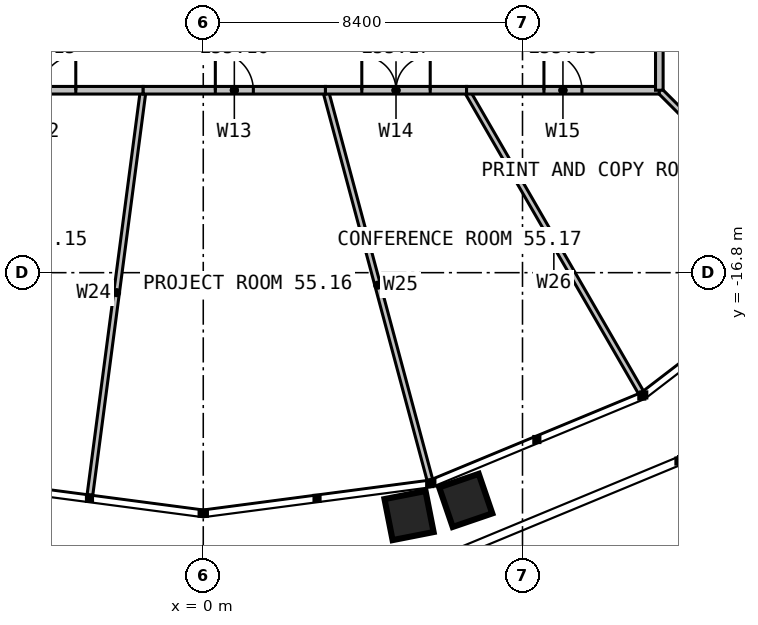
"""IFC4 building model, lengths in metres.
Left out: names, types, materials, properties, quantities, classifications, styles, units other than length and angle.
Written with IfcOpenShell. Run it as: python <this file> out.ifc"""

import sys

from ifc_helpers import new_model, si_unit, direction, frame, frame_2d, origin, place, context, subcontext, project, spatial, rectangle, extrude, element, fill, save


model = new_model("IFC4")
c1 = context("Model", 3, precision=1e-05, world=origin(), true_north=direction((0.0, 1.0)))
c2 = subcontext(c1, "Body", "Model", "MODEL_VIEW")
j1 = project(units=[si_unit("LENGTHUNIT", "METRE"), si_unit("PLANEANGLEUNIT", "RADIAN")], contexts=[c1])
p1 = place(None, origin())
s1 = spatial("IfcSite", under=j1, at=p1, CompositionType="ELEMENT")
p2 = place(p1, origin())
s2 = spatial("IfcBuilding", under=s1, at=p2, CompositionType="ELEMENT")
p3 = place(p2, frame((0.0, 0.0, 228.0)))
s3 = spatial("IfcBuildingStorey", under=s2, at=p3, CompositionType="ELEMENT", Elevation=228.0)
p4 = place(p3, frame((12.0, -6.928, 0.0), z_axis=(0.0, 0.0, 1.0), x_axis=(0.866021843099, -0.500006167237, 0.0)))
e1 = element("IfcWall", 1, at=p4, inside=s3, PredefinedType="PARTITIONING", context=c2, shape_type="SweptSolid", body=[
    extrude(rectangle(XDim=9.187, YDim=0.15, at=frame_2d((4.594, 0.0))), origin(), (0.0, 0.0, 1.0), 2.79),
])
p5 = place(p3, frame((-1.58, -12.0, 0.0), z_axis=(0.0, 0.0, 1.0), x_axis=(-0.130518592205, -0.991445861905, 0.0)))
e2 = element("IfcWall", 2, at=p5, inside=s3, PredefinedType="PARTITIONING", context=c2, shape_type="SweptSolid", body=[
    extrude(rectangle(XDim=10.742, YDim=0.15, at=frame_2d((5.371, 0.0))), origin(), (0.0, 0.0, 1.0), 2.79),
])
p6 = place(p3, frame((3.215, -12.0, 0.0), z_axis=(0.0, 0.0, 1.0), x_axis=(0.258831459304, -0.965922499828, 0.0)))
e3 = element("IfcWall", 3, at=p6, inside=s3, PredefinedType="PARTITIONING", context=c2, shape_type="SweptSolid", body=[
    extrude(rectangle(XDim=10.62, YDim=0.15, at=frame_2d((5.31, 0.0))), origin(), (0.0, 0.0, 1.0), 2.79),
])
p7 = place(p3, frame((6.928, -12.0, 0.0), z_axis=(0.0, 0.0, 1.0), x_axis=(0.500006167237, -0.866021843099, 0.0)))
e4 = element("IfcWall", 4, at=p7, inside=s3, PredefinedType="PARTITIONING", context=c2, shape_type="SweptSolid", body=[
    extrude(rectangle(XDim=9.187, YDim=0.15, at=frame_2d((4.594, 0.0))), origin(), (0.0, 0.0, 1.0), 2.79),
])
p8 = place(p3, frame((12.0, -12.0, 0.0), z_axis=(0.0, 0.0, 1.0), x_axis=(0.707106781187, -0.707106781187, 0.0)))
e5 = element("IfcWall", 5, at=p8, inside=s3, PredefinedType="PARTITIONING", context=c2, shape_type="SweptSolid", body=[
    extrude(rectangle(XDim=6.073, YDim=0.15, at=frame_2d((3.036, 0.0))), origin(), (0.0, 0.0, 1.0), 2.79),
])
p9 = place(p3, frame((-6.928, -12.0, 0.0), z_axis=(0.0, 0.0, 1.0), x_axis=(1.0, 0.0, 0.0)))
e6 = element("IfcWall", 6, at=p9, inside=s3, PredefinedType="PARTITIONING", context=c2, shape_type="SweptSolid", body=[
    extrude(rectangle(XDim=5.348, YDim=0.2, at=frame_2d((2.674, 0.0))), origin(), (0.0, 0.0, 1.0), 3.8),
])
p10 = place(p9, frame((1.774, 0.0, 0.0)))
e7 = element("IfcOpeningElement", 7, at=p10, cuts=e6, PredefinedType="OPENING", context=c2, shape_type="SweptSolid", body=[
    extrude(rectangle(XDim=1.8, YDim=2.2, at=frame_2d((0.9, 1.1))), frame((0.0, 0.11, 0.0), z_axis=(0.0, -1.0, 0.0), x_axis=(1.0, 0.0, 0.0)), (0.0, 0.0, 1.0), 0.22),
])
p11 = place(p3, frame((-1.58, -12.0, 0.0), z_axis=(0.0, 0.0, 1.0), x_axis=(1.0, 0.0, 0.0)))
e8 = element("IfcWall", 8, at=p11, inside=s3, PredefinedType="PARTITIONING", context=c2, shape_type="SweptSolid", body=[
    extrude(rectangle(XDim=4.795, YDim=0.2, at=frame_2d((2.397, 0.0))), origin(), (0.0, 0.0, 1.0), 3.8),
])
p12 = place(p11, frame((1.898, 0.0, 0.0)))
e9 = element("IfcOpeningElement", 9, at=p12, cuts=e8, PredefinedType="OPENING", context=c2, shape_type="SweptSolid", body=[
    extrude(rectangle(XDim=1.0, YDim=2.2, at=frame_2d((0.5, 1.1))), frame((0.0, 0.11, 0.0), z_axis=(0.0, -1.0, 0.0), x_axis=(1.0, 0.0, 0.0)), (0.0, 0.0, 1.0), 0.22),
])
p13 = place(p3, frame((3.215, -12.0, 0.0), z_axis=(0.0, 0.0, 1.0), x_axis=(1.0, 0.0, 0.0)))
e10 = element("IfcWall", 10, at=p13, inside=s3, PredefinedType="PARTITIONING", context=c2, shape_type="SweptSolid", body=[
    extrude(rectangle(XDim=3.713, YDim=0.2, at=frame_2d((1.856, 0.0))), origin(), (0.0, 0.0, 1.0), 3.8),
])
p14 = place(p13, frame((0.956, 0.0, 0.0)))
e11 = element("IfcOpeningElement", 11, at=p14, cuts=e10, PredefinedType="OPENING", context=c2, shape_type="SweptSolid", body=[
    extrude(rectangle(XDim=1.8, YDim=2.2, at=frame_2d((0.9, 1.1))), frame((0.0, 0.11, 0.0), z_axis=(0.0, -1.0, 0.0), x_axis=(1.0, 0.0, 0.0)), (0.0, 0.0, 1.0), 0.22),
])
p15 = place(p3, frame((6.928, -12.0, 0.0), z_axis=(0.0, 0.0, 1.0), x_axis=(1.0, 0.0, 0.0)))
e12 = element("IfcWall", 12, at=p15, inside=s3, PredefinedType="PARTITIONING", context=c2, shape_type="SweptSolid", body=[
    extrude(rectangle(XDim=5.072, YDim=0.2, at=frame_2d((2.536, 0.0))), origin(), (0.0, 0.0, 1.0), 3.8),
])
p16 = place(p15, frame((2.036, 0.0, 0.0)))
e13 = element("IfcOpeningElement", 13, at=p16, cuts=e12, PredefinedType="OPENING", context=c2, shape_type="SweptSolid", body=[
    extrude(rectangle(XDim=1.0, YDim=2.2, at=frame_2d((0.5, 1.1))), frame((0.0, 0.11, 0.0), z_axis=(0.0, -1.0, 0.0), x_axis=(1.0, 0.0, 0.0)), (0.0, 0.0, 1.0), 0.22),
])
p17 = place(p3, frame((12.0, -12.0, 0.0), z_axis=(0.0, 0.0, 1.0), x_axis=(0.0, 1.0, 0.0)))
e14 = element("IfcWall", 14, at=p17, inside=s3, PredefinedType="PARTITIONING", context=c2, shape_type="SweptSolid", body=[
    extrude(rectangle(XDim=5.072, YDim=0.2, at=frame_2d((2.536, 0.0))), origin(), (0.0, 0.0, 1.0), 3.8),
])
p18 = place(p17, frame((2.036, 0.0, 0.0)))
e15 = element("IfcOpeningElement", 15, at=p18, cuts=e14, PredefinedType="OPENING", context=c2, shape_type="SweptSolid", body=[
    extrude(rectangle(XDim=1.0, YDim=2.2, at=frame_2d((0.5, 1.1))), frame((0.0, 0.11, 0.0), z_axis=(0.0, -1.0, 0.0), x_axis=(1.0, 0.0, 0.0)), (0.0, 0.0, 1.0), 0.22),
])
p19 = place(p10, origin())
e16 = element("IfcDoor", 16, at=p19, inside=s3, OperationType="DOUBLE_DOOR_SINGLE_SWING", PredefinedType="DOOR", context=c2, shape_type="SweptSolid", body=[
    extrude(rectangle(XDim=1.8, YDim=2.2, at=frame_2d((0.9, 1.1))), frame((0.0, 0.025, 0.0), z_axis=(0.0, -1.0, 0.0), x_axis=(1.0, 0.0, 0.0)), (0.0, 0.0, 1.0), 0.05),
])
fill(e7, e16)
p20 = place(p12, origin())
e17 = element("IfcDoor", 17, at=p20, inside=s3, OperationType="SINGLE_SWING_LEFT", PredefinedType="DOOR", context=c2, shape_type="SweptSolid", body=[
    extrude(rectangle(XDim=1.0, YDim=2.2, at=frame_2d((0.5, 1.1))), frame((0.0, 0.025, 0.0), z_axis=(0.0, -1.0, 0.0), x_axis=(1.0, 0.0, 0.0)), (0.0, 0.0, 1.0), 0.05),
])
fill(e9, e17)
p21 = place(p14, origin())
e18 = element("IfcDoor", 18, at=p21, inside=s3, OperationType="DOUBLE_DOOR_SINGLE_SWING", PredefinedType="DOOR", context=c2, shape_type="SweptSolid", body=[
    extrude(rectangle(XDim=1.8, YDim=2.2, at=frame_2d((0.9, 1.1))), frame((0.0, 0.025, 0.0), z_axis=(0.0, -1.0, 0.0), x_axis=(1.0, 0.0, 0.0)), (0.0, 0.0, 1.0), 0.05),
])
fill(e11, e18)
p22 = place(p16, origin())
e19 = element("IfcDoor", 19, at=p22, inside=s3, OperationType="SINGLE_SWING_LEFT", PredefinedType="DOOR", context=c2, shape_type="SweptSolid", body=[
    extrude(rectangle(XDim=1.0, YDim=2.2, at=frame_2d((0.5, 1.1))), frame((0.0, 0.025, 0.0), z_axis=(0.0, -1.0, 0.0), x_axis=(1.0, 0.0, 0.0)), (0.0, 0.0, 1.0), 0.05),
])
fill(e13, e19)
save(model, sys.argv[1])
